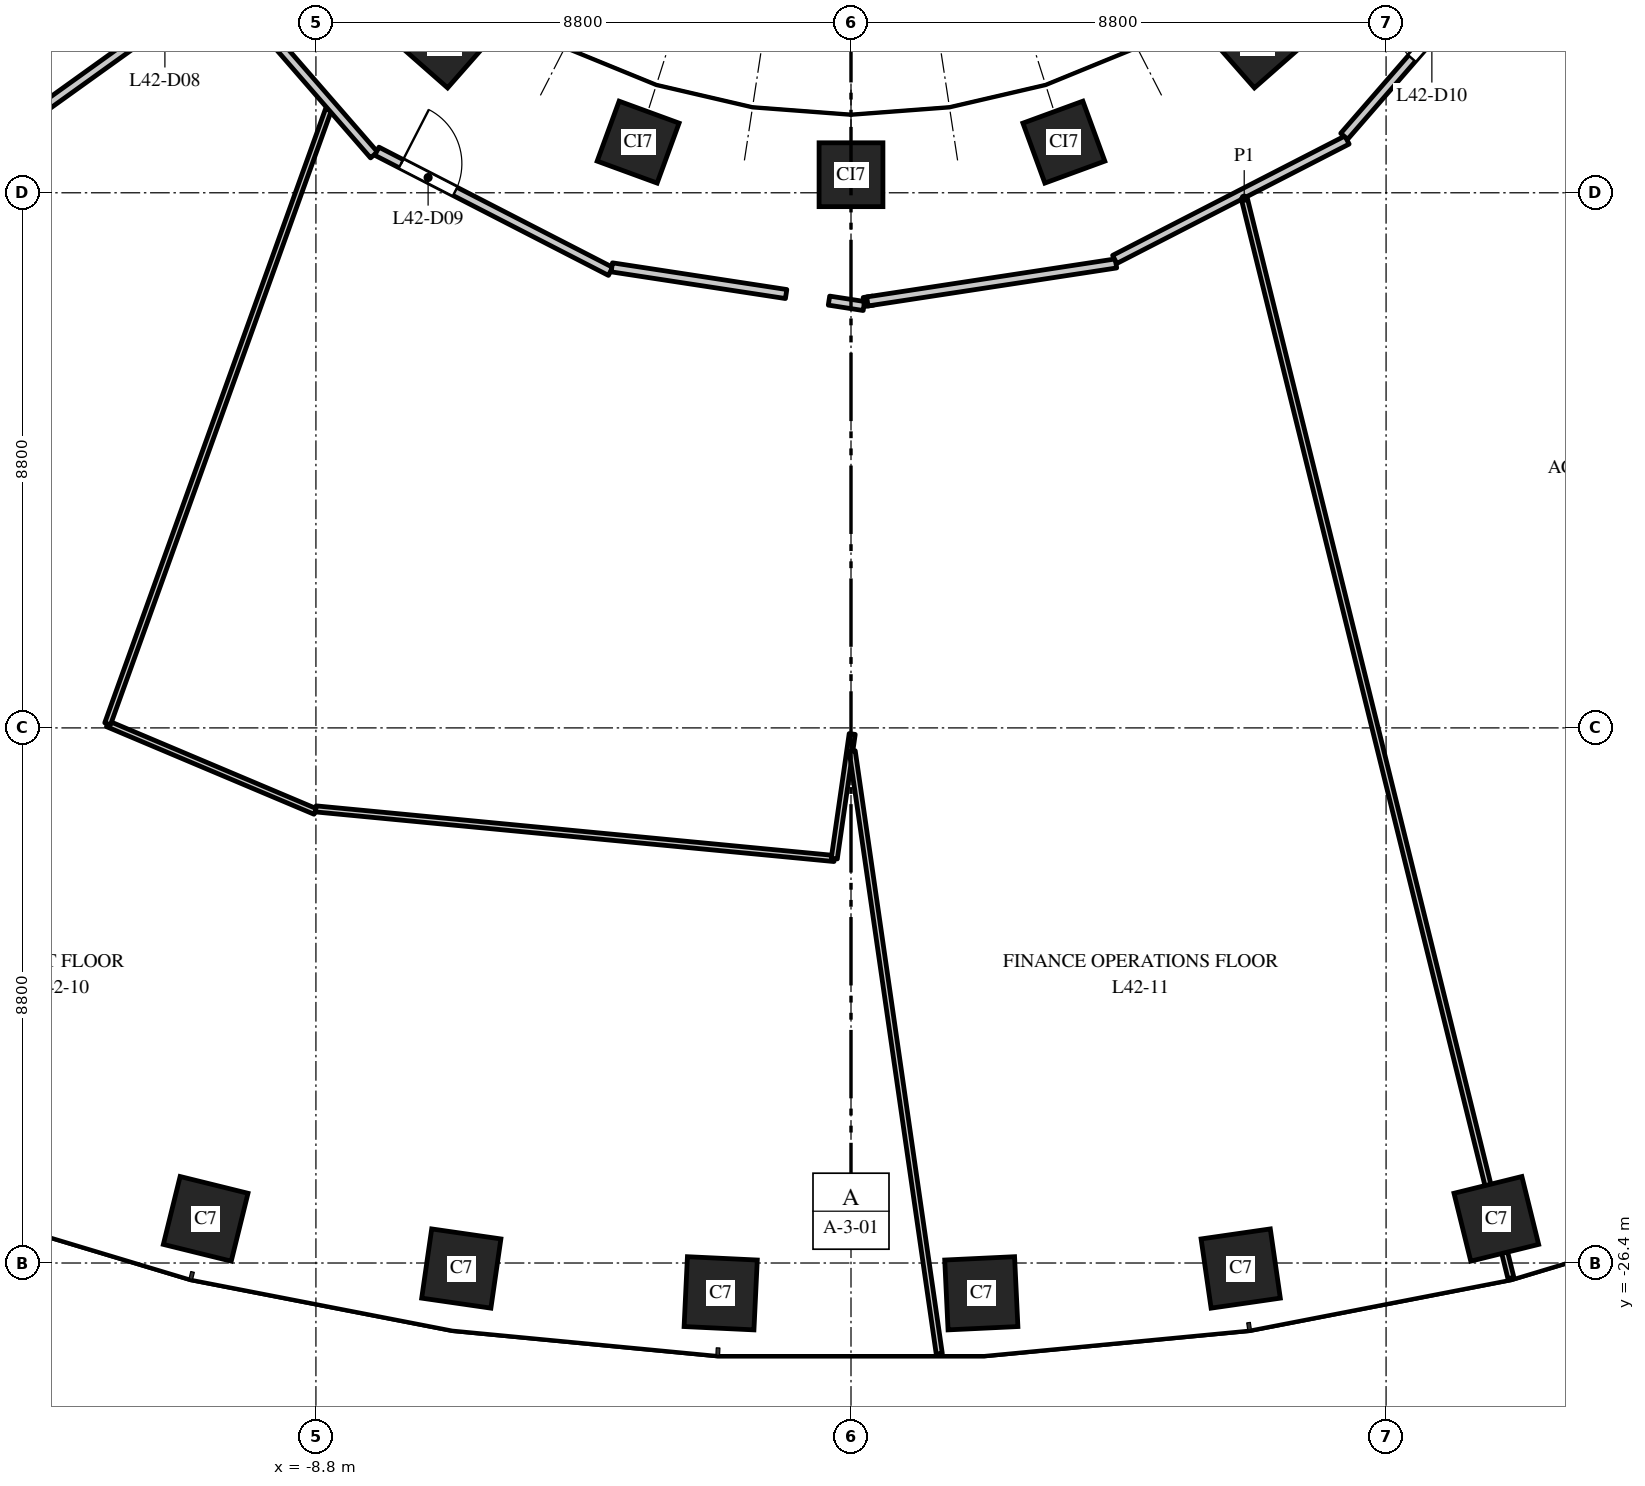
"""IFC4 building model, lengths in metres.
Left out: names, types, materials, properties, quantities, classifications, styles, units other than length and angle.
Written with IfcOpenShell. Run it as: python <this file> out.ifc"""

import sys

from ifc_helpers import new_model, si_unit, direction, frame, frame_2d, origin, origin_2d, place, context, subcontext, project, spatial, rectangle, extrude, element, fill, save


model = new_model("IFC4")
c1 = context("Model", 3, precision=1e-05, world=origin(), true_north=direction((0.0, 1.0)))
c2 = subcontext(c1, "Body", "Model", "MODEL_VIEW")
j1 = project(units=[si_unit("LENGTHUNIT", "METRE"), si_unit("PLANEANGLEUNIT", "RADIAN")], contexts=[c1])
p1 = place(None, origin())
s1 = spatial("IfcSite", under=j1, at=p1, CompositionType="ELEMENT")
p2 = place(p1, origin())
s2 = spatial("IfcBuilding", under=s1, at=p2, CompositionType="ELEMENT")
p3 = place(p2, frame((0.0, 0.0, 182.0)))
s3 = spatial("IfcBuildingStorey", under=s2, at=p3, CompositionType="ELEMENT", Elevation=182.0)
for number, where, z_axis, x_axis in (
    (1, (-10.613, -25.674, 0.0), (0.0, 0.0, 1.0), (0.971, -0.24, 0.0)),
    (2, (-6.409, -26.491, 0.0), (0.0, 0.0, 1.0), (0.99, -0.143, 0.0)),
    (3, (-2.143, -26.898, 0.0), (0.0, 0.0, 1.0), (0.999, -0.048, 0.0)),
    (4, (2.143, -26.898, 0.0), (0.0, 0.0, 1.0), (0.999, 0.048, 0.0)),
    (5, (6.409, -26.491, 0.0), (0.0, 0.0, 1.0), (0.99, 0.143, 0.0)),
    (6, (10.613, -25.674, 0.0), (0.0, 0.0, 1.0), (0.971, 0.24, 0.0)),
):
    element("IfcColumn", number, at=place(p3, frame(where, z_axis=z_axis, x_axis=x_axis)), inside=s3, PredefinedType="COLUMN", context=c2, shape_type="SweptSolid", body=[
        extrude(rectangle(XDim=1.15, YDim=1.15, at=origin_2d()), origin(), (0.0, 0.0, 1.0), 4.0),
    ])
for number, where, z_axis, x_axis in (
    (7, (-6.682, -6.334, 0.0), (0.0, 0.0, 1.0), (0.751, -0.66, 0.0)),
    (8, (-3.501, -7.967, 0.0), (0.0, 0.0, 1.0), (0.939, -0.344, 0.0)),
    (9, (0.0, -8.503, 0.0), (0.0, 0.0, 1.0), (1.0, 0.0, 0.0)),
    (10, (3.501, -7.967, 0.0), (0.0, 0.0, 1.0), (0.939, 0.344, 0.0)),
    (11, (6.682, -6.334, 0.0), (0.0, 0.0, 1.0), (0.751, 0.66, 0.0)),
):
    element("IfcColumn", number, at=place(p3, frame(where, z_axis=z_axis, x_axis=x_axis)), inside=s3, PredefinedType="COLUMN", context=c2, shape_type="SweptSolid", body=[
        extrude(rectangle(XDim=1.05, YDim=1.05, at=origin_2d()), origin(), (0.0, 0.0, 1.0), 4.0),
    ])
p4 = place(p3, frame((-16.5, -7.739, 0.0), z_axis=(0.0, 0.0, 1.0), x_axis=(0.812415179651, 0.583079390712, 0.0)))
e12 = element("IfcWall", 12, at=p4, inside=s3, PredefinedType="PARTITIONING", context=c2, shape_type="SweptSolid", body=[
    extrude(rectangle(XDim=6.68, YDim=0.15, at=frame_2d((3.34, 0.0))), origin(), (0.0, 0.0, 1.0), 3.7),
])
p5 = place(p4, frame((1.45, 0.0, 0.0)))
e13 = element("IfcOpeningElement", 13, at=p5, cuts=e12, PredefinedType="OPENING", context=c2, shape_type="SweptSolid", body=[
    extrude(rectangle(XDim=1.0, YDim=2.1, at=frame_2d((0.5, 1.05))), frame((0.0, 0.085, 0.0), z_axis=(0.0, -1.0, 0.0), x_axis=(1.0, 0.0, 0.0)), (0.0, 0.0, 1.0), 0.17),
])
p6 = place(p3, frame((-15.062, -8.676, 0.0), z_axis=(0.0, 0.0, 1.0), x_axis=(0.812494026232, 0.582969516645, 0.0)))
e14 = element("IfcWall", 14, at=p6, inside=s3, PredefinedType="PARTITIONING", context=c2, shape_type="SweptSolid", body=[
    extrude(rectangle(XDim=5.798, YDim=0.15, at=frame_2d((2.899, 0.0))), origin(), (0.0, 0.0, 1.0), 3.7),
])
p7 = place(p6, frame((4.15, 0.0, 0.0)))
e15 = element("IfcOpeningElement", 15, at=p7, cuts=e14, PredefinedType="OPENING", context=c2, shape_type="SweptSolid", body=[
    extrude(rectangle(XDim=1.0, YDim=2.1, at=frame_2d((0.5, 1.05))), frame((0.0, 0.085, 0.0), z_axis=(0.0, -1.0, 0.0), x_axis=(1.0, 0.0, 0.0)), (0.0, 0.0, 1.0), 0.17),
])
p8 = place(p3, frame((-12.226, -17.533, 0.0), z_axis=(0.0, 0.0, 1.0), x_axis=(0.921281560061, -0.388896242065, 0.0)))
e16 = element("IfcWall", 16, at=p8, inside=s3, PredefinedType="PARTITIONING", context=c2, shape_type="SweptSolid", body=[
    extrude(rectangle(XDim=3.706, YDim=0.1, at=frame_2d((1.853, 0.0))), origin(), (0.0, 0.0, 1.0), 3.7),
])
p9 = place(p3, frame((-12.226, -17.533, 0.0), z_axis=(0.0, 0.0, 1.0), x_axis=(0.3384158552, 0.940996657246, 0.0)))
e17 = element("IfcWall", 17, at=p9, inside=s3, PredefinedType="PARTITIONING", context=c2, shape_type="SweptSolid", body=[
    extrude(rectangle(XDim=10.736, YDim=0.1, at=frame_2d((5.368, 0.0))), origin(), (0.0, 0.0, 1.0), 2.85),
])
p10 = place(p3, frame((-10.351, -5.296, 0.0), z_axis=(0.0, 0.0, 1.0), x_axis=(0.656297424411, -0.754502280124, 0.0)))
e18 = element("IfcWall", 18, at=p10, inside=s3, PredefinedType="PARTITIONING", context=c2, shape_type="SweptSolid", body=[
    extrude(rectangle(XDim=3.819, YDim=0.15, at=frame_2d((1.909, 0.0))), origin(), (0.0, 0.0, 1.0), 2.75),
])
p11 = place(p3, frame((-8.802, -18.932, 0.0), z_axis=(0.0, 0.0, 1.0), x_axis=(0.995450657157, -0.095278482174, 0.0)))
e19 = element("IfcWall", 19, at=p11, inside=s3, PredefinedType="PARTITIONING", context=c2, shape_type="SweptSolid", body=[
    extrude(rectangle(XDim=8.566, YDim=0.1, at=frame_2d((4.283, 0.0))), origin(), (0.0, 0.0, 1.0), 2.85),
])
p12 = place(p3, frame((-7.798, -8.116, 0.0), z_axis=(0.0, 0.0, 1.0), x_axis=(0.889319313061, -0.457286736542, 0.0)))
e20 = element("IfcWall", 20, at=p12, inside=s3, PredefinedType="PARTITIONING", context=c2, shape_type="SweptSolid", body=[
    extrude(rectangle(XDim=4.321, YDim=0.15, at=frame_2d((2.161, 0.0))), origin(), (0.0, 0.0, 1.0), 2.85),
])
p13 = place(p12, frame((0.448, 0.0, 0.0)))
e21 = element("IfcOpeningElement", 21, at=p13, cuts=e20, PredefinedType="OPENING", context=c2, shape_type="SweptSolid", body=[
    extrude(rectangle(XDim=1.0, YDim=2.1, at=frame_2d((0.5, 1.05))), frame((0.0, 0.085, 0.0), z_axis=(0.0, -1.0, 0.0), x_axis=(1.0, 0.0, 0.0)), (0.0, 0.0, 1.0), 0.17),
])
p14 = place(p3, frame((-3.934, -10.026, 0.0), z_axis=(0.0, 0.0, 1.0), x_axis=(0.98846976838, -0.15141835093, 0.0)))
e22 = element("IfcWall", 22, at=p14, inside=s3, PredefinedType="PARTITIONING", context=c2, shape_type="SweptSolid", body=[
    extrude(rectangle(XDim=2.901, YDim=0.15, at=frame_2d((1.45, 0.0))), origin(), (0.0, 0.0, 1.0), 3.7),
])
p15 = place(p3, frame((-0.362, -10.573, 0.0), z_axis=(0.0, 0.0, 1.0), x_axis=(0.98816182156, -0.153415170085, 0.0)))
e23 = element("IfcWall", 23, at=p15, inside=s3, PredefinedType="PARTITIONING", context=c2, shape_type="SweptSolid", body=[
    extrude(rectangle(XDim=0.581, YDim=0.15, at=frame_2d((0.291, 0.0))), origin(), (0.0, 0.0, 1.0), 3.7),
])
p16 = place(p3, frame((-0.275, -19.748, 0.0), z_axis=(0.0, 0.0, 1.0), x_axis=(0.142527983495, 0.9897907728, 0.0)))
e24 = element("IfcWall", 24, at=p16, inside=s3, PredefinedType="PARTITIONING", context=c2, shape_type="SweptSolid", body=[
    extrude(rectangle(XDim=2.069, YDim=0.1, at=frame_2d((1.035, 0.0))), origin(), (0.0, 0.0, 1.0), 3.7),
])
p17 = place(p3, frame((0.02, -17.982, 0.0), z_axis=(0.0, 0.0, 1.0), x_axis=(0.142974028907, -0.989726440517, 0.0)))
e25 = element("IfcWall", 25, at=p17, inside=s3, PredefinedType="PARTITIONING", context=c2, shape_type="SweptSolid", body=[
    extrude(rectangle(XDim=10.015, YDim=0.1, at=frame_2d((5.007, 0.0))), origin(), (0.0, 0.0, 1.0), 2.9),
])
p18 = place(p3, frame((0.212, -10.596, 0.0), z_axis=(0.0, 0.0, 1.0), x_axis=(0.988519881913, 0.15109084374, 0.0)))
e26 = element("IfcWall", 26, at=p18, inside=s3, PredefinedType="PARTITIONING", context=c2, shape_type="SweptSolid", body=[
    extrude(rectangle(XDim=0.152, YDim=0.15, at=frame_2d((0.076, 0.0))), origin(), (0.0, 0.0, 1.0), 3.7),
])
p19 = place(p3, frame((0.269, -10.587, 0.0), z_axis=(0.0, 0.0, 1.0), x_axis=(0.988518620478, 0.151099096514, 0.0)))
e27 = element("IfcWall", 27, at=p19, inside=s3, PredefinedType="PARTITIONING", context=c2, shape_type="SweptSolid", body=[
    extrude(rectangle(XDim=4.136, YDim=0.15, at=frame_2d((2.068, 0.0))), origin(), (0.0, 0.0, 1.0), 2.85),
])
p20 = place(p3, frame((4.337, -9.896, 0.0), z_axis=(0.0, 0.0, 1.0), x_axis=(0.889382211946, 0.457164391739, 0.0)))
e28 = element("IfcWall", 28, at=p20, inside=s3, PredefinedType="PARTITIONING", context=c2, shape_type="SweptSolid", body=[
    extrude(rectangle(XDim=4.296, YDim=0.15, at=frame_2d((2.148, 0.0))), origin(), (0.0, 0.0, 1.0), 2.85),
])
p21 = place(p3, frame((6.467, -8.889, 0.0), z_axis=(0.0, 0.0, 1.0), x_axis=(0.239792865419, -0.970824073504, 0.0)))
e29 = element("IfcWall", 29, at=p21, inside=s3, PredefinedType="PARTITIONING", context=c2, shape_type="SweptSolid", body=[
    extrude(rectangle(XDim=18.291, YDim=0.1, at=frame_2d((9.146, 0.0))), origin(), (0.0, 0.0, 1.0), 2.85),
])
p22 = place(p3, frame((8.111, -7.871, 0.0), z_axis=(0.0, 0.0, 1.0), x_axis=(0.656293818527, 0.754505416656, 0.0)))
e30 = element("IfcWall", 30, at=p22, inside=s3, PredefinedType="PARTITIONING", context=c2, shape_type="SweptSolid", body=[
    extrude(rectangle(XDim=3.413, YDim=0.15, at=frame_2d((1.707, 0.0))), origin(), (0.0, 0.0, 1.0), 2.75),
])
p23 = place(p22, frame((1.697, 0.0, 0.0)))
e31 = element("IfcOpeningElement", 31, at=p23, cuts=e30, PredefinedType="OPENING", context=c2, shape_type="SweptSolid", body=[
    extrude(rectangle(XDim=1.0, YDim=2.1, at=frame_2d((0.5, 1.05))), frame((0.0, 0.085, 0.0), z_axis=(0.0, -1.0, 0.0), x_axis=(1.0, 0.0, 0.0)), (0.0, 0.0, 1.0), 0.17),
])
p24 = place(p3, frame((10.351, -5.296, 0.0), z_axis=(0.0, 0.0, 1.0), x_axis=(0.812494026232, -0.582969516645, 0.0)))
e32 = element("IfcWall", 32, at=p24, inside=s3, PredefinedType="PARTITIONING", context=c2, shape_type="SweptSolid", body=[
    extrude(rectangle(XDim=5.798, YDim=0.15, at=frame_2d((2.899, 0.0))), origin(), (0.0, 0.0, 1.0), 2.75),
])
p25 = place(p3, frame((11.203, -3.938, 0.0), z_axis=(0.0, 0.0, 1.0), x_axis=(0.812471543061, -0.583000850528, 0.0)))
e33 = element("IfcWall", 33, at=p25, inside=s3, PredefinedType="PARTITIONING", context=c2, shape_type="SweptSolid", body=[
    extrude(rectangle(XDim=6.52, YDim=0.15, at=frame_2d((3.26, 0.0))), origin(), (0.0, 0.0, 1.0), 3.7),
])
p26 = place(p25, frame((0.5, 0.0, 0.0)))
e34 = element("IfcOpeningElement", 34, at=p26, cuts=e33, PredefinedType="OPENING", context=c2, shape_type="SweptSolid", body=[
    extrude(rectangle(XDim=1.0, YDim=2.1, at=frame_2d((0.5, 1.05))), frame((0.0, 0.085, 0.0), z_axis=(0.0, -1.0, 0.0), x_axis=(1.0, 0.0, 0.0)), (0.0, 0.0, 1.0), 0.17),
])
p27 = place(p13, origin())
e35 = element("IfcDoor", 35, at=p27, inside=s3, OperationType="SINGLE_SWING_LEFT", PredefinedType="DOOR", context=c2, shape_type="SweptSolid", body=[
    extrude(rectangle(XDim=1.0, YDim=2.1, at=frame_2d((0.5, 1.05))), frame((0.0, 0.025, 0.0), z_axis=(0.0, -1.0, 0.0), x_axis=(1.0, 0.0, 0.0)), (0.0, 0.0, 1.0), 0.05),
])
fill(e21, e35)
p28 = place(p23, origin())
e36 = element("IfcDoor", 36, at=p28, inside=s3, OperationType="SINGLE_SWING_RIGHT", PredefinedType="DOOR", context=c2, shape_type="SweptSolid", body=[
    extrude(rectangle(XDim=1.0, YDim=2.1, at=frame_2d((0.5, 1.05))), frame((0.0, 0.025, 0.0), z_axis=(0.0, -1.0, 0.0), x_axis=(1.0, 0.0, 0.0)), (0.0, 0.0, 1.0), 0.05),
])
fill(e31, e36)
save(model, sys.argv[1])
